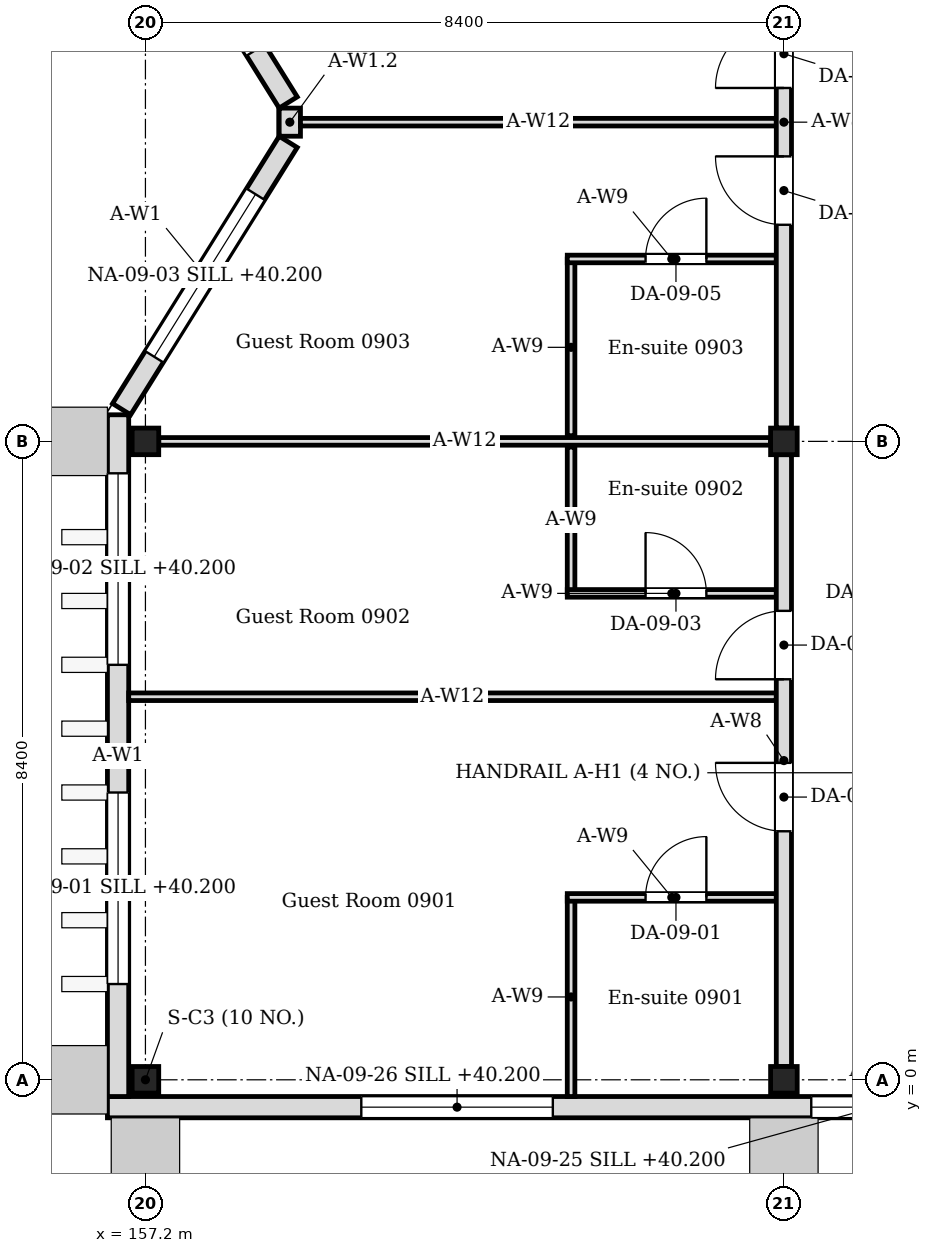
"""IFC4 building model, lengths in metres.
Left out: names, types, materials, properties, quantities, classifications, styles, units other than length and angle.
Written with IfcOpenShell. Run it as: python <this file> out.ifc"""

import sys

from ifc_helpers import new_model, si_unit, direction, frame, frame_2d, origin, origin_2d, place, context, subcontext, project, spatial, rectangle, i_section, extrude, element, fill, save


model = new_model("IFC4")
c1 = context("Model", 3, precision=1e-05, world=origin(), true_north=direction((0.0, 1.0)))
c2 = subcontext(c1, "Body", "Model", "MODEL_VIEW")
j1 = project(units=[si_unit("LENGTHUNIT", "METRE"), si_unit("PLANEANGLEUNIT", "RADIAN")], contexts=[c1])
p1 = place(None, origin())
s1 = spatial("IfcSite", under=j1, at=p1, CompositionType="ELEMENT")
p2 = place(p1, origin())
s2 = spatial("IfcBuilding", under=s1, at=p2, CompositionType="ELEMENT")
p3 = place(p2, frame((0.0, 0.0, 39.6)))
s3 = spatial("IfcBuildingStorey", under=s2, at=p3, CompositionType="ELEMENT", Elevation=39.6)
for number, where, z_axis, x_axis in (
    (1, (157.2, 0.0, 0.0), (0.0, 0.0, 1.0), (1.0, 0.0, 0.0)),
    (2, (157.2, 8.4, 0.0), (0.0, 0.0, 1.0), (1.0, 0.0, 0.0)),
    (3, (165.6, 0.0, 0.0), (0.0, 0.0, 1.0), (1.0, 0.0, 0.0)),
    (4, (165.6, 8.4, 0.0), (0.0, 0.0, 1.0), (1.0, 0.0, 0.0)),
):
    element("IfcColumn", number, at=place(p3, frame(where, z_axis=z_axis, x_axis=x_axis)), inside=s3, PredefinedType="COLUMN", context=c2, shape_type="SweptSolid", body=[
        extrude(i_section(OverallWidth=0.35, OverallDepth=0.35, WebThickness=0.012, FlangeThickness=0.019, FilletRadius=0.013, at=origin_2d()), origin(), (0.0, 0.0, 1.0), 4.2),
    ])
p4 = place(p3, frame((156.84, -0.22, 0.0), z_axis=(0.0, 0.0, 1.0), x_axis=(0.0, 1.0, 0.0)))
e5 = element("IfcWall", 5, at=p4, inside=s3, PredefinedType="SOLIDWALL", context=c2, shape_type="SweptSolid", body=[
    extrude(rectangle(XDim=8.97, YDim=0.28, at=frame_2d((4.485, 0.0))), origin(), (0.0, 0.0, 1.0), 4.05),
])
p5 = place(p4, frame((1.48, 0.0, 0.6)))
e6 = element("IfcOpeningElement", 6, at=p5, cuts=e5, PredefinedType="OPENING", context=c2, shape_type="SweptSolid", body=[
    extrude(rectangle(XDim=2.52, YDim=2.4, at=frame_2d((1.26, 1.2))), frame((0.0, 0.15, 0.0), z_axis=(0.0, -1.0, 0.0), x_axis=(1.0, 0.0, 0.0)), (0.0, 0.0, 1.0), 0.3),
])
p6 = place(p4, frame((5.68, 0.0, 0.6)))
e7 = element("IfcOpeningElement", 7, at=p6, cuts=e5, PredefinedType="OPENING", context=c2, shape_type="SweptSolid", body=[
    extrude(rectangle(XDim=2.52, YDim=2.4, at=frame_2d((1.26, 1.2))), frame((0.0, 0.15, 0.0), z_axis=(0.0, -1.0, 0.0), x_axis=(1.0, 0.0, 0.0)), (0.0, 0.0, 1.0), 0.3),
])
p7 = place(p3, frame((156.886, 8.824, 0.0), z_axis=(0.0, 0.0, 1.0), x_axis=(0.529018946142, 0.848610013271, 0.0)))
e8 = element("IfcWall", 8, at=p7, inside=s3, PredefinedType="SOLIDWALL", context=c2, shape_type="SweptSolid", body=[
    extrude(rectangle(XDim=4.144, YDim=0.28, at=frame_2d((2.072, 0.0))), origin(), (0.0, 0.0, 1.0), 4.05),
])
p8 = place(p7, frame((0.812, 0.0, 0.6)))
e9 = element("IfcOpeningElement", 9, at=p8, cuts=e8, PredefinedType="OPENING", context=c2, shape_type="SweptSolid", body=[
    extrude(rectangle(XDim=2.52, YDim=2.4, at=frame_2d((1.26, 1.2))), frame((0.0, 0.15, 0.0), z_axis=(0.0, -1.0, 0.0), x_axis=(1.0, 0.0, 0.0)), (0.0, 0.0, 1.0), 0.3),
])
p9 = place(p3, frame((159.079, 12.859, 0.0), z_axis=(0.0, 0.0, 1.0), x_axis=(-0.528992500338, 0.848626498871, 0.0)))
e10 = element("IfcWall", 10, at=p9, inside=s3, PredefinedType="SOLIDWALL", context=c2, shape_type="SweptSolid", body=[
    extrude(rectangle(XDim=4.145, YDim=0.28, at=frame_2d((2.072, 0.0))), origin(), (0.0, 0.0, 1.0), 4.05),
])
p10 = place(p9, frame((0.812, 0.0, 0.6)))
e11 = element("IfcOpeningElement", 11, at=p10, cuts=e10, PredefinedType="OPENING", context=c2, shape_type="SweptSolid", body=[
    extrude(rectangle(XDim=2.52, YDim=2.4, at=frame_2d((1.26, 1.2))), frame((0.0, 0.15, 0.0), z_axis=(0.0, -1.0, 0.0), x_axis=(1.0, 0.0, 0.0)), (0.0, 0.0, 1.0), 0.3),
])
p11 = place(p3, frame((159.1, 12.415, 0.0), z_axis=(0.0, 0.0, 1.0), x_axis=(0.0, 1.0, 0.0)))
e12 = element("IfcWall", 12, at=p11, inside=s3, PredefinedType="SOLIDWALL", context=c2, shape_type="SweptSolid", body=[
    extrude(rectangle(XDim=0.37, YDim=0.28, at=frame_2d((0.185, 0.0))), origin(), (0.0, 0.0, 1.0), 3.604),
])
p12 = place(p3, frame((156.7, -0.36, 0.0), z_axis=(0.0, 0.0, 1.0), x_axis=(1.0, 0.0, 0.0)))
e13 = element("IfcWall", 13, at=p12, inside=s3, PredefinedType="SOLIDWALL", context=c2, shape_type="SweptSolid", body=[
    extrude(rectangle(XDim=20.2, YDim=0.28, at=frame_2d((10.1, 0.0))), origin(), (0.0, 0.0, 1.0), 4.05),
])
p13 = place(p12, frame((9.26, 0.0, 0.6)))
e14 = element("IfcOpeningElement", 14, at=p13, cuts=e13, PredefinedType="OPENING", context=c2, shape_type="SweptSolid", body=[
    extrude(rectangle(XDim=1.68, YDim=2.4, at=frame_2d((0.84, 1.2))), frame((0.0, 0.15, 0.0), z_axis=(0.0, -1.0, 0.0), x_axis=(1.0, 0.0, 0.0)), (0.0, 0.0, 1.0), 0.3),
])
p14 = place(p12, frame((3.34, 0.0, 0.6)))
e15 = element("IfcOpeningElement", 15, at=p14, cuts=e13, PredefinedType="OPENING", context=c2, shape_type="SweptSolid", body=[
    extrude(rectangle(XDim=2.52, YDim=2.4, at=frame_2d((1.26, 1.2))), frame((0.0, 0.15, 0.0), z_axis=(0.0, -1.0, 0.0), x_axis=(1.0, 0.0, 0.0)), (0.0, 0.0, 1.0), 0.3),
])
p15 = place(p3, frame((162.8, -0.22, 0.0), z_axis=(0.0, 0.0, 1.0), x_axis=(0.0, 1.0, 0.0)))
e16 = element("IfcWall", 16, at=p15, inside=s3, PredefinedType="PARTITIONING", context=c2, shape_type="SweptSolid", body=[
    extrude(rectangle(XDim=2.62, YDim=0.1, at=frame_2d((1.31, 0.0))), origin(), (0.0, 0.0, 1.0), 4.05),
])
p16 = place(p3, frame((162.75, 2.4, 0.0), z_axis=(0.0, 0.0, 1.0), x_axis=(1.0, 0.0, 0.0)))
e17 = element("IfcWall", 17, at=p16, inside=s3, PredefinedType="PARTITIONING", context=c2, shape_type="SweptSolid", body=[
    extrude(rectangle(XDim=2.75, YDim=0.1, at=frame_2d((1.375, 0.0))), origin(), (0.0, 0.0, 1.0), 4.05),
])
p17 = place(p16, frame((1.03, 0.0, 0.0)))
e18 = element("IfcOpeningElement", 18, at=p17, cuts=e17, PredefinedType="OPENING", context=c2, shape_type="SweptSolid", body=[
    extrude(rectangle(XDim=0.8, YDim=2.1, at=frame_2d((0.4, 1.05))), frame((0.0, 0.06, 0.0), z_axis=(0.0, -1.0, 0.0), x_axis=(1.0, 0.0, 0.0)), (0.0, 0.0, 1.0), 0.12),
])
p18 = place(p3, frame((162.8, 6.4, 0.0), z_axis=(0.0, 0.0, 1.0), x_axis=(0.0, 1.0, 0.0)))
e19 = element("IfcWall", 19, at=p18, inside=s3, PredefinedType="PARTITIONING", context=c2, shape_type="SweptSolid", body=[
    extrude(rectangle(XDim=1.925, YDim=0.1, at=frame_2d((0.962, 0.0))), origin(), (0.0, 0.0, 1.0), 4.05),
])
p19 = place(p3, frame((162.75, 6.4, 0.0), z_axis=(0.0, 0.0, 1.0), x_axis=(1.0, 0.0, 0.0)))
e20 = element("IfcWall", 20, at=p19, inside=s3, PredefinedType="PARTITIONING", context=c2, shape_type="SweptSolid", body=[
    extrude(rectangle(XDim=2.75, YDim=0.1, at=frame_2d((1.375, 0.0))), origin(), (0.0, 0.0, 1.0), 4.05),
])
p20 = place(p19, frame((1.03, 0.0, 0.0)))
e21 = element("IfcOpeningElement", 21, at=p20, cuts=e20, PredefinedType="OPENING", context=c2, shape_type="SweptSolid", body=[
    extrude(rectangle(XDim=0.8, YDim=2.1, at=frame_2d((0.4, 1.05))), frame((0.0, 0.06, 0.0), z_axis=(0.0, -1.0, 0.0), x_axis=(1.0, 0.0, 0.0)), (0.0, 0.0, 1.0), 0.12),
])
p21 = place(p3, frame((162.8, 8.475, 0.0), z_axis=(0.0, 0.0, 1.0), x_axis=(0.0, 1.0, 0.0)))
e22 = element("IfcWall", 22, at=p21, inside=s3, PredefinedType="PARTITIONING", context=c2, shape_type="SweptSolid", body=[
    extrude(rectangle(XDim=2.325, YDim=0.1, at=frame_2d((1.163, 0.0))), origin(), (0.0, 0.0, 1.0), 4.05),
])
p22 = place(p3, frame((162.75, 10.8, 0.0), z_axis=(0.0, 0.0, 1.0), x_axis=(1.0, 0.0, 0.0)))
e23 = element("IfcWall", 23, at=p22, inside=s3, PredefinedType="PARTITIONING", context=c2, shape_type="SweptSolid", body=[
    extrude(rectangle(XDim=2.75, YDim=0.1, at=frame_2d((1.375, 0.0))), origin(), (0.0, 0.0, 1.0), 4.05),
])
p23 = place(p22, frame((1.03, 0.0, 0.0)))
e24 = element("IfcOpeningElement", 24, at=p23, cuts=e23, PredefinedType="OPENING", context=c2, shape_type="SweptSolid", body=[
    extrude(rectangle(XDim=0.8, YDim=2.1, at=frame_2d((0.4, 1.05))), frame((0.0, 0.06, 0.0), z_axis=(0.0, -1.0, 0.0), x_axis=(1.0, 0.0, 0.0)), (0.0, 0.0, 1.0), 0.12),
])
p24 = place(p3, frame((157.375, 8.4, 0.0), z_axis=(0.0, 0.0, 1.0), x_axis=(1.0, 0.0, 0.0)))
e25 = element("IfcWall", 25, at=p24, inside=s3, PredefinedType="PARTITIONING", context=c2, shape_type="SweptSolid", body=[
    extrude(rectangle(XDim=8.05, YDim=0.1, at=frame_2d((4.025, 0.0))), origin(), (0.0, 0.0, 1.0), 3.604),
])
p25 = place(p3, frame((156.98, 5.04, 0.0), z_axis=(0.0, 0.0, 1.0), x_axis=(1.0, 0.0, 0.0)))
e26 = element("IfcWall", 26, at=p25, inside=s3, PredefinedType="PARTITIONING", context=c2, shape_type="SweptSolid", body=[
    extrude(rectangle(XDim=8.52, YDim=0.1, at=frame_2d((4.26, 0.0))), origin(), (0.0, 0.0, 1.0), 3.604),
])
p26 = place(p3, frame((159.24, 12.6, 0.0), z_axis=(0.0, 0.0, 1.0), x_axis=(1.0, 0.0, 0.0)))
e27 = element("IfcWall", 27, at=p26, inside=s3, PredefinedType="PARTITIONING", context=c2, shape_type="SweptSolid", body=[
    extrude(rectangle(XDim=6.26, YDim=0.1, at=frame_2d((3.13, 0.0))), origin(), (0.0, 0.0, 1.0), 3.604),
])
p27 = place(p3, frame((165.6, 0.175, 0.0), z_axis=(0.0, 0.0, 1.0), x_axis=(0.0, 1.0, 0.0)))
e28 = element("IfcWall", 28, at=p27, inside=s3, PredefinedType="PARTITIONING", context=c2, shape_type="SweptSolid", body=[
    extrude(rectangle(XDim=8.05, YDim=0.2, at=frame_2d((4.025, 0.0))), origin(), (0.0, 0.0, 1.0), 3.45),
])
p28 = place(p27, frame((3.095, 0.0, 0.0)))
e29 = element("IfcOpeningElement", 29, at=p28, cuts=e28, PredefinedType="OPENING", context=c2, shape_type="SweptSolid", body=[
    extrude(rectangle(XDim=0.9, YDim=2.1, at=frame_2d((0.45, 1.05))), frame((0.0, 0.11, 0.0), z_axis=(0.0, -1.0, 0.0), x_axis=(1.0, 0.0, 0.0)), (0.0, 0.0, 1.0), 0.22),
])
p29 = place(p27, frame((5.095, 0.0, 0.0)))
e30 = element("IfcOpeningElement", 30, at=p29, cuts=e28, PredefinedType="OPENING", context=c2, shape_type="SweptSolid", body=[
    extrude(rectangle(XDim=0.9, YDim=2.1, at=frame_2d((0.45, 1.05))), frame((0.0, 0.11, 0.0), z_axis=(0.0, -1.0, 0.0), x_axis=(1.0, 0.0, 0.0)), (0.0, 0.0, 1.0), 0.22),
])
p30 = place(p3, frame((165.6, 8.575, 0.0), z_axis=(0.0, 0.0, 1.0), x_axis=(0.0, 1.0, 0.0)))
e31 = element("IfcWall", 31, at=p30, inside=s3, PredefinedType="PARTITIONING", context=c2, shape_type="SweptSolid", body=[
    extrude(rectangle(XDim=8.05, YDim=0.2, at=frame_2d((4.025, 0.0))), origin(), (0.0, 0.0, 1.0), 3.45),
])
p31 = place(p30, frame((2.675, 0.0, 0.0)))
e32 = element("IfcOpeningElement", 32, at=p31, cuts=e31, PredefinedType="OPENING", context=c2, shape_type="SweptSolid", body=[
    extrude(rectangle(XDim=0.9, YDim=2.1, at=frame_2d((0.45, 1.05))), frame((0.0, 0.11, 0.0), z_axis=(0.0, -1.0, 0.0), x_axis=(1.0, 0.0, 0.0)), (0.0, 0.0, 1.0), 0.22),
])
p32 = place(p30, frame((4.475, 0.0, 0.0)))
e33 = element("IfcOpeningElement", 33, at=p32, cuts=e31, PredefinedType="OPENING", context=c2, shape_type="SweptSolid", body=[
    extrude(rectangle(XDim=0.9, YDim=2.1, at=frame_2d((0.45, 1.05))), frame((0.0, 0.11, 0.0), z_axis=(0.0, -1.0, 0.0), x_axis=(1.0, 0.0, 0.0)), (0.0, 0.0, 1.0), 0.22),
])
p33 = place(p5, origin())
e34 = element("IfcWindow", 34, at=p33, inside=s3, PartitioningType="SINGLE_PANEL", PredefinedType="WINDOW", context=c2, shape_type="SweptSolid", body=[
    extrude(rectangle(XDim=2.52, YDim=2.4, at=frame_2d((1.26, 1.2))), frame((0.0, 0.03, 0.0), z_axis=(0.0, -1.0, 0.0), x_axis=(1.0, 0.0, 0.0)), (0.0, 0.0, 1.0), 0.06),
])
fill(e6, e34)
p34 = place(p6, origin())
e35 = element("IfcWindow", 35, at=p34, inside=s3, PartitioningType="SINGLE_PANEL", PredefinedType="WINDOW", context=c2, shape_type="SweptSolid", body=[
    extrude(rectangle(XDim=2.52, YDim=2.4, at=frame_2d((1.26, 1.2))), frame((0.0, 0.03, 0.0), z_axis=(0.0, -1.0, 0.0), x_axis=(1.0, 0.0, 0.0)), (0.0, 0.0, 1.0), 0.06),
])
fill(e7, e35)
p35 = place(p8, origin())
e36 = element("IfcWindow", 36, at=p35, inside=s3, PartitioningType="SINGLE_PANEL", PredefinedType="WINDOW", context=c2, shape_type="SweptSolid", body=[
    extrude(rectangle(XDim=2.52, YDim=2.4, at=frame_2d((1.26, 1.2))), frame((0.0, 0.03, 0.0), z_axis=(0.0, -1.0, 0.0), x_axis=(1.0, 0.0, 0.0)), (0.0, 0.0, 1.0), 0.06),
])
fill(e9, e36)
p36 = place(p13, origin())
e37 = element("IfcWindow", 37, at=p36, inside=s3, PartitioningType="SINGLE_PANEL", PredefinedType="WINDOW", context=c2, shape_type="SweptSolid", body=[
    extrude(rectangle(XDim=1.68, YDim=2.4, at=frame_2d((0.84, 1.2))), frame((0.0, 0.03, 0.0), z_axis=(0.0, -1.0, 0.0), x_axis=(1.0, 0.0, 0.0)), (0.0, 0.0, 1.0), 0.06),
])
fill(e14, e37)
p37 = place(p14, origin())
e38 = element("IfcWindow", 38, at=p37, inside=s3, PartitioningType="SINGLE_PANEL", PredefinedType="WINDOW", context=c2, shape_type="SweptSolid", body=[
    extrude(rectangle(XDim=2.52, YDim=2.4, at=frame_2d((1.26, 1.2))), frame((0.0, 0.03, 0.0), z_axis=(0.0, -1.0, 0.0), x_axis=(1.0, 0.0, 0.0)), (0.0, 0.0, 1.0), 0.06),
])
fill(e15, e38)
p38 = place(p17, origin())
e39 = element("IfcDoor", 39, at=p38, inside=s3, OperationType="SINGLE_SWING_RIGHT", PredefinedType="DOOR", context=c2, shape_type="SweptSolid", body=[
    extrude(rectangle(XDim=0.8, YDim=2.1, at=frame_2d((0.4, 1.05))), frame((0.0, 0.025, 0.0), z_axis=(0.0, -1.0, 0.0), x_axis=(1.0, 0.0, 0.0)), (0.0, 0.0, 1.0), 0.05),
])
fill(e18, e39)
p39 = place(p28, origin())
e40 = element("IfcDoor", 40, at=p39, inside=s3, OperationType="SINGLE_SWING_RIGHT", PredefinedType="DOOR", context=c2, shape_type="SweptSolid", body=[
    extrude(rectangle(XDim=0.9, YDim=2.1, at=frame_2d((0.45, 1.05))), frame((0.0, 0.025, 0.0), z_axis=(0.0, -1.0, 0.0), x_axis=(1.0, 0.0, 0.0)), (0.0, 0.0, 1.0), 0.05),
])
fill(e29, e40)
p40 = place(p20, origin())
e41 = element("IfcDoor", 41, at=p40, inside=s3, OperationType="SINGLE_SWING_LEFT", PredefinedType="DOOR", context=c2, shape_type="SweptSolid", body=[
    extrude(rectangle(XDim=0.8, YDim=2.1, at=frame_2d((0.4, 1.05))), frame((0.0, 0.025, 0.0), z_axis=(0.0, -1.0, 0.0), x_axis=(1.0, 0.0, 0.0)), (0.0, 0.0, 1.0), 0.05),
])
fill(e21, e41)
p41 = place(p29, origin())
e42 = element("IfcDoor", 42, at=p41, inside=s3, OperationType="SINGLE_SWING_LEFT", PredefinedType="DOOR", context=c2, shape_type="SweptSolid", body=[
    extrude(rectangle(XDim=0.9, YDim=2.1, at=frame_2d((0.45, 1.05))), frame((0.0, 0.025, 0.0), z_axis=(0.0, -1.0, 0.0), x_axis=(1.0, 0.0, 0.0)), (0.0, 0.0, 1.0), 0.05),
])
fill(e30, e42)
p42 = place(p23, origin())
e43 = element("IfcDoor", 43, at=p42, inside=s3, OperationType="SINGLE_SWING_RIGHT", PredefinedType="DOOR", context=c2, shape_type="SweptSolid", body=[
    extrude(rectangle(XDim=0.8, YDim=2.1, at=frame_2d((0.4, 1.05))), frame((0.0, 0.025, 0.0), z_axis=(0.0, -1.0, 0.0), x_axis=(1.0, 0.0, 0.0)), (0.0, 0.0, 1.0), 0.05),
])
fill(e24, e43)
p43 = place(p31, origin())
e44 = element("IfcDoor", 44, at=p43, inside=s3, OperationType="SINGLE_SWING_RIGHT", PredefinedType="DOOR", context=c2, shape_type="SweptSolid", body=[
    extrude(rectangle(XDim=0.9, YDim=2.1, at=frame_2d((0.45, 1.05))), frame((0.0, 0.025, 0.0), z_axis=(0.0, -1.0, 0.0), x_axis=(1.0, 0.0, 0.0)), (0.0, 0.0, 1.0), 0.05),
])
fill(e32, e44)
p44 = place(p32, origin())
e45 = element("IfcDoor", 45, at=p44, inside=s3, OperationType="SINGLE_SWING_LEFT", PredefinedType="DOOR", context=c2, shape_type="SweptSolid", body=[
    extrude(rectangle(XDim=0.9, YDim=2.1, at=frame_2d((0.45, 1.05))), frame((0.0, 0.025, 0.0), z_axis=(0.0, -1.0, 0.0), x_axis=(1.0, 0.0, 0.0)), (0.0, 0.0, 1.0), 0.05),
])
fill(e33, e45)
save(model, sys.argv[1])
